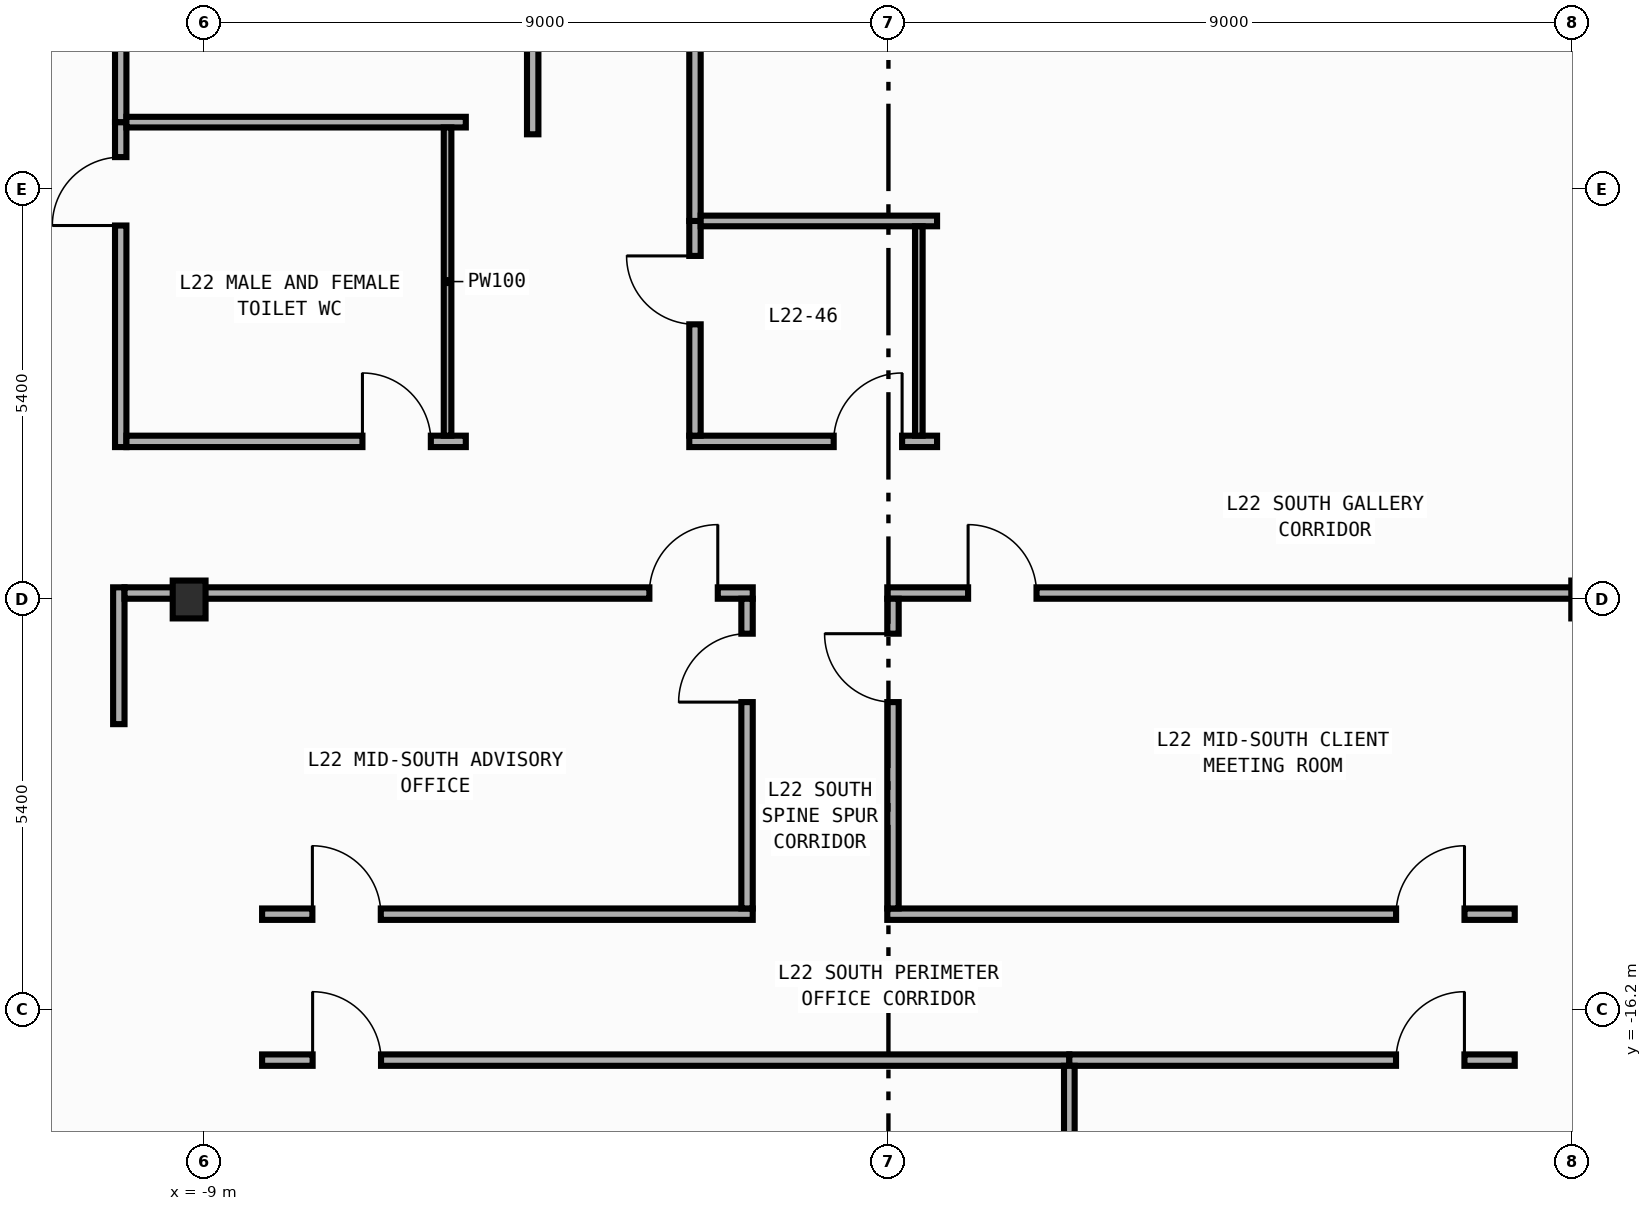
"""IFC4 building model, lengths in metres.
Left out: names, types, materials, properties, quantities, classifications, styles, units other than length and angle.
Written with IfcOpenShell. Run it as: python <this file> out.ifc"""

import sys

from ifc_helpers import new_model, si_unit, direction, frame, frame_2d, origin, origin_2d, place, context, subcontext, project, spatial, rectangle, i_section, extrude, element, fill, save


model = new_model("IFC4")
c1 = context("Model", 3, precision=1e-05, world=origin(), true_north=direction((0.0, 1.0)))
c2 = subcontext(c1, "Body", "Model", "MODEL_VIEW")
j1 = project(units=[si_unit("LENGTHUNIT", "METRE"), si_unit("PLANEANGLEUNIT", "RADIAN")], contexts=[c1])
p1 = place(None, origin())
s1 = spatial("IfcSite", under=j1, at=p1, CompositionType="ELEMENT")
p2 = place(p1, origin())
s2 = spatial("IfcBuilding", under=s1, at=p2, CompositionType="ELEMENT")
p3 = place(p2, frame((0.0, 0.0, 97.4)))
s3 = spatial("IfcBuildingStorey", under=s2, at=p3, CompositionType="ELEMENT", Elevation=97.4)
for number, where, z_axis, x_axis in (
    (1, (-9.2, -10.8, 0.0), (0.0, 0.0, 1.0), (1.0, 0.0, 0.0)),
    (2, (9.2, -10.8, 0.0), (0.0, 0.0, 1.0), (1.0, 0.0, 0.0)),
):
    element("IfcColumn", number, at=place(p3, frame(where, z_axis=z_axis, x_axis=x_axis)), inside=s3, PredefinedType="COLUMN", context=c2, shape_type="SweptSolid", body=[
        extrude(i_section(OverallWidth=0.432, OverallDepth=0.498, WebThickness=0.045, FlangeThickness=0.07, FilletRadius=0.022, at=origin_2d()), origin(), (0.0, 0.0, 1.0), 4.2),
    ])
p4 = place(p3, frame((-10.1, -8.795, 0.0), z_axis=(0.0, 0.0, 1.0), x_axis=(0.0, 1.0, 0.0)))
e3 = element("IfcWall", 3, at=p4, inside=s3, PredefinedType="PARTITIONING", context=c2, shape_type="SweptSolid", body=[
    extrude(rectangle(XDim=4.275, YDim=0.15, at=frame_2d((2.137, 0.0))), origin(), (0.0, 0.0, 1.0), 3.94),
])
p5 = place(p4, frame((2.915, 0.0, 0.0)))
e4 = element("IfcOpeningElement", 4, at=p5, cuts=e3, PredefinedType="OPENING", context=c2, shape_type="SweptSolid", body=[
    extrude(rectangle(XDim=0.9, YDim=2.15, at=frame_2d((0.45, 1.075))), frame((0.0, 0.085, 0.0), z_axis=(0.0, -1.0, 0.0), x_axis=(1.0, 0.0, 0.0)), (0.0, 0.0, 1.0), 0.17),
])
p6 = place(p3, frame((-10.1, -4.52, 0.0), z_axis=(0.0, 0.0, 1.0), x_axis=(0.0, 1.0, 0.0)))
e5 = element("IfcWall", 5, at=p6, inside=s3, PredefinedType="PARTITIONING", context=c2, shape_type="SweptSolid", body=[
    extrude(rectangle(XDim=12.315, YDim=0.15, at=frame_2d((6.157, 0.0))), origin(), (0.0, 0.0, 1.0), 3.94),
])
p7 = place(p6, frame((9.542, 0.0, 0.0)))
e6 = element("IfcOpeningElement", 6, at=p7, cuts=e5, PredefinedType="OPENING", context=c2, shape_type="SweptSolid", body=[
    extrude(rectangle(XDim=0.9, YDim=2.15, at=frame_2d((0.45, 1.075))), frame((0.0, 0.085, 0.0), z_axis=(0.0, -1.0, 0.0), x_axis=(1.0, 0.0, 0.0)), (0.0, 0.0, 1.0), 0.17),
])
p8 = place(p3, frame((-10.125, -12.44, 0.0), z_axis=(0.0, 0.0, 1.0), x_axis=(0.0, 1.0, 0.0)))
e7 = element("IfcWall", 7, at=p8, inside=s3, PredefinedType="PARTITIONING", context=c2, shape_type="SweptSolid", body=[
    extrude(rectangle(XDim=1.8, YDim=0.15, at=frame_2d((0.9, 0.0))), origin(), (0.0, 0.0, 1.0), 3.94),
])
p9 = place(p3, frame((-2.62, -8.72, 0.0), z_axis=(0.0, 0.0, 1.0), x_axis=(1.0, 0.0, 0.0)))
e8 = element("IfcWall", 8, at=p9, inside=s3, PredefinedType="PARTITIONING", context=c2, shape_type="SweptSolid", body=[
    extrude(rectangle(XDim=3.26, YDim=0.15, at=frame_2d((1.63, 0.0))), origin(), (0.0, 0.0, 1.0), 3.94),
])
p10 = place(p9, frame((1.9, 0.0, 0.0)))
e9 = element("IfcOpeningElement", 9, at=p10, cuts=e8, PredefinedType="OPENING", context=c2, shape_type="SweptSolid", body=[
    extrude(rectangle(XDim=0.9, YDim=2.15, at=frame_2d((0.45, 1.075))), frame((0.0, 0.085, 0.0), z_axis=(0.0, -1.0, 0.0), x_axis=(1.0, 0.0, 0.0)), (0.0, 0.0, 1.0), 0.17),
])
p11 = place(p3, frame((-10.025, -8.72, 0.0), z_axis=(0.0, 0.0, 1.0), x_axis=(1.0, 0.0, 0.0)))
e10 = element("IfcWall", 10, at=p11, inside=s3, PredefinedType="PARTITIONING", context=c2, shape_type="SweptSolid", body=[
    extrude(rectangle(XDim=4.465, YDim=0.15, at=frame_2d((2.232, 0.0))), origin(), (0.0, 0.0, 1.0), 3.94),
])
p12 = place(p11, frame((3.105, 0.0, 0.0)))
e11 = element("IfcOpeningElement", 11, at=p12, cuts=e10, PredefinedType="OPENING", context=c2, shape_type="SweptSolid", body=[
    extrude(rectangle(XDim=0.9, YDim=2.15, at=frame_2d((0.45, 1.075))), frame((0.0, 0.085, 0.0), z_axis=(0.0, -1.0, 0.0), x_axis=(1.0, 0.0, 0.0)), (0.0, 0.0, 1.0), 0.17),
])
p13 = place(p3, frame((-10.05, -10.715, 0.0), z_axis=(0.0, 0.0, 1.0), x_axis=(1.0, 0.0, 0.0)))
e12 = element("IfcWall", 12, at=p13, inside=s3, PredefinedType="PARTITIONING", context=c2, shape_type="SweptSolid", body=[
    extrude(rectangle(XDim=8.265, YDim=0.15, at=frame_2d((4.133, 0.0))), origin(), (0.0, 0.0, 1.0), 3.24),
])
p14 = place(p13, frame((6.905, 0.0, 0.0)))
e13 = element("IfcOpeningElement", 13, at=p14, cuts=e12, PredefinedType="OPENING", context=c2, shape_type="SweptSolid", body=[
    extrude(rectangle(XDim=0.9, YDim=2.15, at=frame_2d((0.45, 1.075))), frame((0.0, 0.085, 0.0), z_axis=(0.0, -1.0, 0.0), x_axis=(1.0, 0.0, 0.0)), (0.0, 0.0, 1.0), 0.17),
])
p15 = place(p3, frame((-0.015, -10.715, 0.0), z_axis=(0.0, 0.0, 1.0), x_axis=(1.0, 0.0, 0.0)))
e14 = element("IfcWall", 14, at=p15, inside=s3, PredefinedType="PARTITIONING", context=c2, shape_type="SweptSolid", body=[
    extrude(rectangle(XDim=10.065, YDim=0.15, at=frame_2d((5.032, 0.0))), origin(), (0.0, 0.0, 1.0), 3.24),
])
p16 = place(p15, frame((1.063, 0.0, 0.0)))
e15 = element("IfcOpeningElement", 15, at=p16, cuts=e14, PredefinedType="OPENING", context=c2, shape_type="SweptSolid", body=[
    extrude(rectangle(XDim=0.9, YDim=2.15, at=frame_2d((0.45, 1.075))), frame((0.0, 0.085, 0.0), z_axis=(0.0, -1.0, 0.0), x_axis=(1.0, 0.0, 0.0)), (0.0, 0.0, 1.0), 0.17),
])
p17 = place(p3, frame((-2.545, -8.645, 0.0), z_axis=(0.0, 0.0, 1.0), x_axis=(0.0, 1.0, 0.0)))
e16 = element("IfcWall", 16, at=p17, inside=s3, PredefinedType="PARTITIONING", context=c2, shape_type="SweptSolid", body=[
    extrude(rectangle(XDim=2.825, YDim=0.15, at=frame_2d((1.413, 0.0))), origin(), (0.0, 0.0, 1.0), 3.94),
])
p18 = place(p17, frame((1.465, 0.0, 0.0)))
e17 = element("IfcOpeningElement", 17, at=p18, cuts=e16, PredefinedType="OPENING", context=c2, shape_type="SweptSolid", body=[
    extrude(rectangle(XDim=0.9, YDim=2.15, at=frame_2d((0.45, 1.075))), frame((0.0, 0.085, 0.0), z_axis=(0.0, -1.0, 0.0), x_axis=(1.0, 0.0, 0.0)), (0.0, 0.0, 1.0), 0.17),
])
p19 = place(p3, frame((-2.545, -5.82, 0.0), z_axis=(0.0, 0.0, 1.0), x_axis=(0.0, 1.0, 0.0)))
e18 = element("IfcWall", 18, at=p19, inside=s3, PredefinedType="PARTITIONING", context=c2, shape_type="SweptSolid", body=[
    extrude(rectangle(XDim=13.465, YDim=0.15, at=frame_2d((6.732, 0.0))), origin(), (0.0, 0.0, 1.0), 3.94),
])
p20 = place(p19, frame((10.7, 0.0, 0.0)))
e19 = element("IfcOpeningElement", 19, at=p20, cuts=e18, PredefinedType="OPENING", context=c2, shape_type="SweptSolid", body=[
    extrude(rectangle(XDim=0.9, YDim=2.15, at=frame_2d((0.45, 1.075))), frame((0.0, 0.085, 0.0), z_axis=(0.0, -1.0, 0.0), x_axis=(1.0, 0.0, 0.0)), (0.0, 0.0, 1.0), 0.17),
])
p21 = place(p3, frame((-4.68, -4.68, 0.0), z_axis=(0.0, 0.0, 1.0), x_axis=(0.0, 1.0, 0.0)))
e20 = element("IfcWall", 20, at=p21, inside=s3, PredefinedType="PARTITIONING", context=c2, shape_type="SweptSolid", body=[
    extrude(rectangle(XDim=12.325, YDim=0.15, at=frame_2d((6.163, 0.0))), origin(), (0.0, 0.0, 1.0), 3.49),
])
p22 = place(p21, frame((9.551, 0.0, 0.0)))
e21 = element("IfcOpeningElement", 21, at=p22, cuts=e20, PredefinedType="OPENING", context=c2, shape_type="SweptSolid", body=[
    extrude(rectangle(XDim=0.9, YDim=2.15, at=frame_2d((0.45, 1.075))), frame((0.0, 0.085, 0.0), z_axis=(0.0, -1.0, 0.0), x_axis=(1.0, 0.0, 0.0)), (0.0, 0.0, 1.0), 0.17),
])
p23 = place(p3, frame((-8.24, -16.86, 0.0), z_axis=(0.0, 0.0, 1.0), x_axis=(1.0, 0.0, 0.0)))
e22 = element("IfcWall", 22, at=p23, inside=s3, PredefinedType="PARTITIONING", context=c2, shape_type="SweptSolid", body=[
    extrude(rectangle(XDim=10.62, YDim=0.15, at=frame_2d((5.31, 0.0))), origin(), (0.0, 0.0, 1.0), 3.94),
])
p24 = place(p23, frame((0.665, 0.0, 0.0)))
e23 = element("IfcOpeningElement", 23, at=p24, cuts=e22, PredefinedType="OPENING", context=c2, shape_type="SweptSolid", body=[
    extrude(rectangle(XDim=0.9, YDim=2.15, at=frame_2d((0.45, 1.075))), frame((0.0, 0.085, 0.0), z_axis=(0.0, -1.0, 0.0), x_axis=(1.0, 0.0, 0.0)), (0.0, 0.0, 1.0), 0.17),
])
p25 = place(p3, frame((2.38, -16.86, 0.0), z_axis=(0.0, 0.0, 1.0), x_axis=(1.0, 0.0, 0.0)))
e24 = element("IfcWall", 24, at=p25, inside=s3, PredefinedType="PARTITIONING", context=c2, shape_type="SweptSolid", body=[
    extrude(rectangle(XDim=5.86, YDim=0.15, at=frame_2d((2.93, 0.0))), origin(), (0.0, 0.0, 1.0), 3.94),
])
p26 = place(p25, frame((4.298, 0.0, 0.0)))
e25 = element("IfcOpeningElement", 25, at=p26, cuts=e24, PredefinedType="OPENING", context=c2, shape_type="SweptSolid", body=[
    extrude(rectangle(XDim=0.9, YDim=2.15, at=frame_2d((0.45, 1.075))), frame((0.0, 0.085, 0.0), z_axis=(0.0, -1.0, 0.0), x_axis=(1.0, 0.0, 0.0)), (0.0, 0.0, 1.0), 0.17),
])
p27 = place(p3, frame((-8.24, -14.94, 0.0), z_axis=(0.0, 0.0, 1.0), x_axis=(1.0, 0.0, 0.0)))
e26 = element("IfcWall", 26, at=p27, inside=s3, PredefinedType="PARTITIONING", context=c2, shape_type="SweptSolid", body=[
    extrude(rectangle(XDim=6.455, YDim=0.15, at=frame_2d((3.228, 0.0))), origin(), (0.0, 0.0, 1.0), 3.94),
])
p28 = place(p27, frame((0.662, 0.0, 0.0)))
e27 = element("IfcOpeningElement", 27, at=p28, cuts=e26, PredefinedType="OPENING", context=c2, shape_type="SweptSolid", body=[
    extrude(rectangle(XDim=0.9, YDim=2.15, at=frame_2d((0.45, 1.075))), frame((0.0, 0.085, 0.0), z_axis=(0.0, -1.0, 0.0), x_axis=(1.0, 0.0, 0.0)), (0.0, 0.0, 1.0), 0.17),
])
p29 = place(p3, frame((-0.015, -14.94, 0.0), z_axis=(0.0, 0.0, 1.0), x_axis=(1.0, 0.0, 0.0)))
e28 = element("IfcWall", 28, at=p29, inside=s3, PredefinedType="PARTITIONING", context=c2, shape_type="SweptSolid", body=[
    extrude(rectangle(XDim=8.255, YDim=0.15, at=frame_2d((4.127, 0.0))), origin(), (0.0, 0.0, 1.0), 3.94),
])
p30 = place(p29, frame((6.694, 0.0, 0.0)))
e29 = element("IfcOpeningElement", 29, at=p30, cuts=e28, PredefinedType="OPENING", context=c2, shape_type="SweptSolid", body=[
    extrude(rectangle(XDim=0.9, YDim=2.15, at=frame_2d((0.45, 1.075))), frame((0.0, 0.085, 0.0), z_axis=(0.0, -1.0, 0.0), x_axis=(1.0, 0.0, 0.0)), (0.0, 0.0, 1.0), 0.17),
])
p31 = place(p3, frame((-1.86, -14.865, 0.0), z_axis=(0.0, 0.0, 1.0), x_axis=(0.0, 1.0, 0.0)))
e30 = element("IfcWall", 30, at=p31, inside=s3, PredefinedType="PARTITIONING", context=c2, shape_type="SweptSolid", body=[
    extrude(rectangle(XDim=4.075, YDim=0.15, at=frame_2d((2.038, 0.0))), origin(), (0.0, 0.0, 1.0), 3.94),
])
p32 = place(p31, frame((2.715, 0.0, 0.0)))
e31 = element("IfcOpeningElement", 31, at=p32, cuts=e30, PredefinedType="OPENING", context=c2, shape_type="SweptSolid", body=[
    extrude(rectangle(XDim=0.9, YDim=2.15, at=frame_2d((0.45, 1.075))), frame((0.0, 0.085, 0.0), z_axis=(0.0, -1.0, 0.0), x_axis=(1.0, 0.0, 0.0)), (0.0, 0.0, 1.0), 0.17),
])
p33 = place(p3, frame((0.06, -14.865, 0.0), z_axis=(0.0, 0.0, 1.0), x_axis=(0.0, 1.0, 0.0)))
e32 = element("IfcWall", 32, at=p33, inside=s3, PredefinedType="PARTITIONING", context=c2, shape_type="SweptSolid", body=[
    extrude(rectangle(XDim=4.075, YDim=0.15, at=frame_2d((2.038, 0.0))), origin(), (0.0, 0.0, 1.0), 3.94),
])
p34 = place(p33, frame((2.715, 0.0, 0.0)))
e33 = element("IfcOpeningElement", 33, at=p34, cuts=e32, PredefinedType="OPENING", context=c2, shape_type="SweptSolid", body=[
    extrude(rectangle(XDim=0.9, YDim=2.15, at=frame_2d((0.45, 1.075))), frame((0.0, 0.085, 0.0), z_axis=(0.0, -1.0, 0.0), x_axis=(1.0, 0.0, 0.0)), (0.0, 0.0, 1.0), 0.17),
])
p35 = place(p3, frame((2.38, -26.055, 0.0), z_axis=(0.0, 0.0, 1.0), x_axis=(0.0, 1.0, 0.0)))
e34 = element("IfcWall", 34, at=p35, inside=s3, PredefinedType="PARTITIONING", context=c2, shape_type="SweptSolid", body=[
    extrude(rectangle(XDim=9.12, YDim=0.14, at=frame_2d((4.56, 0.0))), origin(), (0.0, 0.0, 1.0), 3.94),
])
p36 = place(p3, frame((-2.47, -5.82, 0.0), z_axis=(0.0, 0.0, 1.0), x_axis=(1.0, 0.0, 0.0)))
e35 = element("IfcWall", 35, at=p36, inside=s3, PredefinedType="PARTITIONING", context=c2, shape_type="SweptSolid", body=[
    extrude(rectangle(XDim=3.11, YDim=0.14, at=frame_2d((1.555, 0.0))), origin(), (0.0, 0.0, 1.0), 3.94),
])
p37 = place(p3, frame((-10.025, -4.52, 0.0), z_axis=(0.0, 0.0, 1.0), x_axis=(1.0, 0.0, 0.0)))
e36 = element("IfcWall", 36, at=p37, inside=s3, PredefinedType="PARTITIONING", context=c2, shape_type="SweptSolid", body=[
    extrude(rectangle(XDim=4.465, YDim=0.14, at=frame_2d((2.232, 0.0))), origin(), (0.0, 0.0, 1.0), 3.94),
])
p38 = place(p3, frame((0.4, -5.89, 0.0), z_axis=(0.0, 0.0, 1.0), x_axis=(0.0, -1.0, 0.0)))
e37 = element("IfcWall", 37, at=p38, inside=s3, PredefinedType="PARTITIONING", context=c2, shape_type="SweptSolid", body=[
    extrude(rectangle(XDim=2.755, YDim=0.1, at=frame_2d((1.377, 0.0))), origin(), (0.0, 0.0, 1.0), 3.94),
])
p39 = place(p3, frame((-5.8, -4.59, 0.0), z_axis=(0.0, 0.0, 1.0), x_axis=(0.0, -1.0, 0.0)))
e38 = element("IfcWall", 38, at=p39, inside=s3, PredefinedType="PARTITIONING", context=c2, shape_type="SweptSolid", body=[
    extrude(rectangle(XDim=4.055, YDim=0.1, at=frame_2d((2.027, 0.0))), origin(), (0.0, 0.0, 1.0), 3.94),
])
p40 = place(p5, origin())
e39 = element("IfcDoor", 39, at=p40, inside=s3, OperationType="SINGLE_SWING_LEFT", PredefinedType="DOOR", context=c2, shape_type="SweptSolid", body=[
    extrude(rectangle(XDim=0.9, YDim=2.15, at=frame_2d((0.45, 1.075))), frame((0.0, 0.025, 0.0), z_axis=(0.0, -1.0, 0.0), x_axis=(1.0, 0.0, 0.0)), (0.0, 0.0, 1.0), 0.05),
])
fill(e4, e39)
p41 = place(p10, origin())
e40 = element("IfcDoor", 40, at=p41, inside=s3, OperationType="SINGLE_SWING_RIGHT", PredefinedType="DOOR", context=c2, shape_type="SweptSolid", body=[
    extrude(rectangle(XDim=0.9, YDim=2.15, at=frame_2d((0.45, 1.075))), frame((0.0, 0.025, 0.0), z_axis=(0.0, -1.0, 0.0), x_axis=(1.0, 0.0, 0.0)), (0.0, 0.0, 1.0), 0.05),
])
fill(e9, e40)
p42 = place(p12, origin())
e41 = element("IfcDoor", 41, at=p42, inside=s3, OperationType="SINGLE_SWING_LEFT", PredefinedType="DOOR", context=c2, shape_type="SweptSolid", body=[
    extrude(rectangle(XDim=0.9, YDim=2.15, at=frame_2d((0.45, 1.075))), frame((0.0, 0.025, 0.0), z_axis=(0.0, -1.0, 0.0), x_axis=(1.0, 0.0, 0.0)), (0.0, 0.0, 1.0), 0.05),
])
fill(e11, e41)
p43 = place(p14, origin())
e42 = element("IfcDoor", 42, at=p43, inside=s3, OperationType="SINGLE_SWING_RIGHT", PredefinedType="DOOR", context=c2, shape_type="SweptSolid", body=[
    extrude(rectangle(XDim=0.9, YDim=2.15, at=frame_2d((0.45, 1.075))), frame((0.0, 0.025, 0.0), z_axis=(0.0, -1.0, 0.0), x_axis=(1.0, 0.0, 0.0)), (0.0, 0.0, 1.0), 0.05),
])
fill(e13, e42)
p44 = place(p16, origin())
e43 = element("IfcDoor", 43, at=p44, inside=s3, OperationType="SINGLE_SWING_LEFT", PredefinedType="DOOR", context=c2, shape_type="SweptSolid", body=[
    extrude(rectangle(XDim=0.9, YDim=2.15, at=frame_2d((0.45, 1.075))), frame((0.0, 0.025, 0.0), z_axis=(0.0, -1.0, 0.0), x_axis=(1.0, 0.0, 0.0)), (0.0, 0.0, 1.0), 0.05),
])
fill(e15, e43)
p45 = place(p18, origin())
e44 = element("IfcDoor", 44, at=p45, inside=s3, OperationType="SINGLE_SWING_RIGHT", PredefinedType="DOOR", context=c2, shape_type="SweptSolid", body=[
    extrude(rectangle(XDim=0.9, YDim=2.15, at=frame_2d((0.45, 1.075))), frame((0.0, 0.025, 0.0), z_axis=(0.0, -1.0, 0.0), x_axis=(1.0, 0.0, 0.0)), (0.0, 0.0, 1.0), 0.05),
])
fill(e17, e44)
p46 = place(p24, origin())
e45 = element("IfcDoor", 45, at=p46, inside=s3, OperationType="SINGLE_SWING_LEFT", PredefinedType="DOOR", context=c2, shape_type="SweptSolid", body=[
    extrude(rectangle(XDim=0.9, YDim=2.15, at=frame_2d((0.45, 1.075))), frame((0.0, 0.025, 0.0), z_axis=(0.0, -1.0, 0.0), x_axis=(1.0, 0.0, 0.0)), (0.0, 0.0, 1.0), 0.05),
])
fill(e23, e45)
p47 = place(p26, origin())
e46 = element("IfcDoor", 46, at=p47, inside=s3, OperationType="SINGLE_SWING_RIGHT", PredefinedType="DOOR", context=c2, shape_type="SweptSolid", body=[
    extrude(rectangle(XDim=0.9, YDim=2.15, at=frame_2d((0.45, 1.075))), frame((0.0, 0.025, 0.0), z_axis=(0.0, -1.0, 0.0), x_axis=(1.0, 0.0, 0.0)), (0.0, 0.0, 1.0), 0.05),
])
fill(e25, e46)
p48 = place(p28, origin())
e47 = element("IfcDoor", 47, at=p48, inside=s3, OperationType="SINGLE_SWING_LEFT", PredefinedType="DOOR", context=c2, shape_type="SweptSolid", body=[
    extrude(rectangle(XDim=0.9, YDim=2.15, at=frame_2d((0.45, 1.075))), frame((0.0, 0.025, 0.0), z_axis=(0.0, -1.0, 0.0), x_axis=(1.0, 0.0, 0.0)), (0.0, 0.0, 1.0), 0.05),
])
fill(e27, e47)
p49 = place(p30, origin())
e48 = element("IfcDoor", 48, at=p49, inside=s3, OperationType="SINGLE_SWING_RIGHT", PredefinedType="DOOR", context=c2, shape_type="SweptSolid", body=[
    extrude(rectangle(XDim=0.9, YDim=2.15, at=frame_2d((0.45, 1.075))), frame((0.0, 0.025, 0.0), z_axis=(0.0, -1.0, 0.0), x_axis=(1.0, 0.0, 0.0)), (0.0, 0.0, 1.0), 0.05),
])
fill(e29, e48)
p50 = place(p32, origin())
e49 = element("IfcDoor", 49, at=p50, inside=s3, OperationType="SINGLE_SWING_LEFT", PredefinedType="DOOR", context=c2, shape_type="SweptSolid", body=[
    extrude(rectangle(XDim=0.9, YDim=2.15, at=frame_2d((0.45, 1.075))), frame((0.0, 0.025, 0.0), z_axis=(0.0, -1.0, 0.0), x_axis=(1.0, 0.0, 0.0)), (0.0, 0.0, 1.0), 0.05),
])
fill(e31, e49)
p51 = place(p34, origin())
e50 = element("IfcDoor", 50, at=p51, inside=s3, OperationType="SINGLE_SWING_RIGHT", PredefinedType="DOOR", context=c2, shape_type="SweptSolid", body=[
    extrude(rectangle(XDim=0.9, YDim=2.15, at=frame_2d((0.45, 1.075))), frame((0.0, 0.025, 0.0), z_axis=(0.0, -1.0, 0.0), x_axis=(1.0, 0.0, 0.0)), (0.0, 0.0, 1.0), 0.05),
])
fill(e33, e50)
save(model, sys.argv[1])
